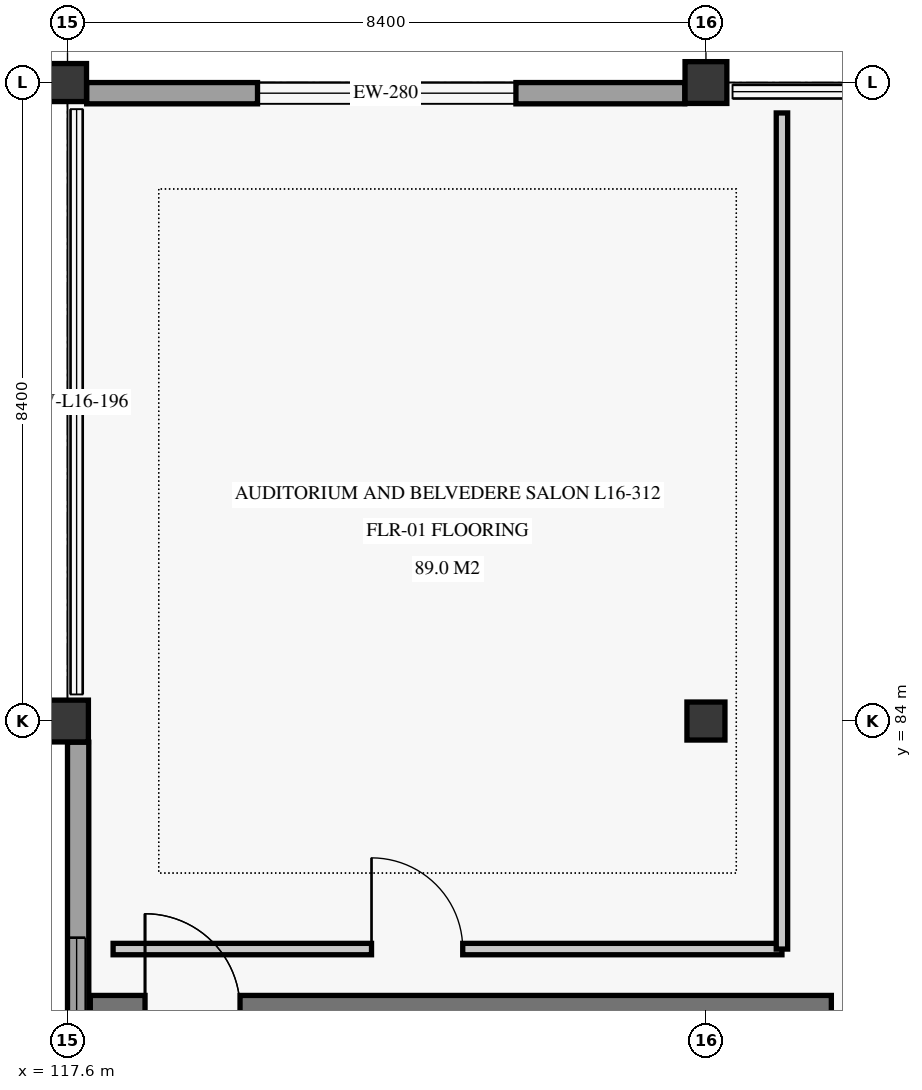
"""IFC4 building model, lengths in metres.
Left out: names, types, materials, properties, quantities, classifications, styles, units other than length and angle.
Written with IfcOpenShell. Run it as: python <this file> out.ifc"""

import sys

from ifc_helpers import new_model, si_unit, direction, frame, frame_2d, origin, origin_2d, place, context, subcontext, project, spatial, polyline, rectangle, outline, extrude, element, fill, save


model = new_model("IFC4")
c1 = context("Model", 3, precision=1e-05, world=origin(), true_north=direction((0.0, 1.0)))
c2 = subcontext(c1, "Body", "Model", "MODEL_VIEW")
j1 = project(units=[si_unit("LENGTHUNIT", "METRE"), si_unit("PLANEANGLEUNIT", "RADIAN")], contexts=[c1])
p1 = place(None, origin())
s1 = spatial("IfcSite", under=j1, at=p1, CompositionType="ELEMENT")
p2 = place(p1, origin())
s2 = spatial("IfcBuilding", under=s1, at=p2, CompositionType="ELEMENT")
p3 = place(p2, frame((0.0, 0.0, 66.7)))
s3 = spatial("IfcBuildingStorey", under=s2, at=p3, CompositionType="ELEMENT", Elevation=66.7)
p4 = place(p3, frame((117.6, 84.0, 0.0), z_axis=(0.0, 0.0, 1.0), x_axis=(1.0, 0.0, 0.0)))
e1 = element("IfcColumn", 1, at=p4, inside=s3, PredefinedType="COLUMN", context=c2, shape_type="SweptSolid", body=[
    extrude(rectangle(XDim=0.55, YDim=0.55, at=origin_2d()), origin(), (0.0, 0.0, 1.0), 4.22),
])
for number, where, z_axis, x_axis in (
    (2, (117.6, 92.4, 0.0), (0.0, 0.0, 1.0), (1.0, 0.0, 0.0)),
    (3, (126.0, 84.0, 0.0), (0.0, 0.0, 1.0), (1.0, 0.0, 0.0)),
):
    element("IfcColumn", number, at=place(p3, frame(where, z_axis=z_axis, x_axis=x_axis)), inside=s3, PredefinedType="COLUMN", context=c2, shape_type="SweptSolid", body=[
        extrude(rectangle(XDim=0.5, YDim=0.5, at=origin_2d()), origin(), (0.0, 0.0, 1.0), 4.22),
    ])
p5 = place(p3, frame((126.0, 92.4, 0.0), z_axis=(0.0, 0.0, 1.0), x_axis=(1.0, 0.0, 0.0)))
e4 = element("IfcColumn", 4, at=p5, inside=s3, PredefinedType="COLUMN", context=c2, shape_type="SweptSolid", body=[
    extrude(rectangle(XDim=0.55, YDim=0.55, at=origin_2d()), origin(), (0.0, 0.0, 1.0), 4.22),
])
p6 = place(p3, frame((117.852, 92.26, 0.0), z_axis=(0.0, 0.0, 1.0), x_axis=(1.0, 0.0, 0.0)))
e5 = element("IfcWall", 5, at=p6, inside=s3, PredefinedType="SOLIDWALL", context=c2, shape_type="SweptSolid", body=[
    extrude(rectangle(XDim=7.87, YDim=0.28, at=frame_2d((3.935, 0.0))), origin(), (0.0, 0.0, 1.0), 3.54),
])
p7 = place(p6, frame((2.248, 0.0, 0.85)))
e6 = element("IfcOpeningElement", 6, at=p7, cuts=e5, PredefinedType="OPENING", context=c2, shape_type="SweptSolid", body=[
    extrude(rectangle(XDim=3.4, YDim=1.9, at=frame_2d((1.7, 0.95))), frame((0.0, 0.15, 0.0), z_axis=(0.0, -1.0, 0.0), x_axis=(1.0, 0.0, 0.0)), (0.0, 0.0, 1.0), 0.3),
])
p8 = place(p3, frame((117.74, 75.852, 0.0), z_axis=(0.0, 0.0, 1.0), x_axis=(0.0, 1.0, 0.0)))
e7 = element("IfcWall", 7, at=p8, inside=s3, PredefinedType="SOLIDWALL", context=c2, shape_type="SweptSolid", body=[
    extrude(rectangle(XDim=7.87, YDim=0.28, at=frame_2d((3.935, 0.0))), origin(), (0.0, 0.0, 1.0), 3.54),
])
p9 = place(p8, frame((0.948, 0.0, 0.85)))
e8 = element("IfcOpeningElement", 8, at=p9, cuts=e7, PredefinedType="OPENING", context=c2, shape_type="SweptSolid", body=[
    extrude(rectangle(XDim=2.2, YDim=1.8, at=frame_2d((1.1, 0.9))), frame((0.0, 0.15, 0.0), z_axis=(0.0, -1.0, 0.0), x_axis=(1.0, 0.0, 0.0)), (0.0, 0.0, 1.0), 0.3),
])
p10 = place(p3, frame((117.766, 92.28, 4.5), z_axis=(0.0, 0.0, 1.0), x_axis=(1.0, 0.0, 0.0)))
e9 = element("IfcWall", 9, at=p10, inside=s3, PredefinedType="SOLIDWALL", context=c2, shape_type="SweptSolid", body=[
    extrude(outline(polyline([(0.0, 0.0), (8.104, 0.0), (8.104, 4.2), (4.052, 3.6), (0.0, 3.0), (0.0, 0.0)])), frame((0.0, 0.115, 0.0), z_axis=(0.0, -1.0, 0.0), x_axis=(1.0, 0.0, 0.0)), (0.0, 0.0, 1.0), 0.23),
])
p11 = place(p3, frame((126.13, 92.28, 4.5), z_axis=(0.0, 0.0, 1.0), x_axis=(1.0, 0.0, 0.0)))
e10 = element("IfcWall", 10, at=p11, inside=s3, PredefinedType="SOLIDWALL", context=c2, shape_type="SweptSolid", body=[
    extrude(rectangle(XDim=8.14, YDim=0.23, at=frame_2d((4.07, 0.0))), origin(), (0.0, 0.0, 1.0), 3.15),
])
p12 = place(p11, frame((2.27, 0.0, 0.45)))
e11 = element("IfcOpeningElement", 11, at=p12, cuts=e10, PredefinedType="OPENING", context=c2, shape_type="SweptSolid", body=[
    extrude(rectangle(XDim=3.6, YDim=2.3, at=frame_2d((1.8, 1.15))), frame((0.0, 0.125, 0.0), z_axis=(0.0, -1.0, 0.0), x_axis=(1.0, 0.0, 0.0)), (0.0, 0.0, 1.0), 0.25),
])
p13 = place(p3, frame((117.72, 75.73, 4.5), z_axis=(0.0, 0.0, 1.0), x_axis=(0.0, 1.0, 0.0)))
e12 = element("IfcWall", 12, at=p13, inside=s3, PredefinedType="SOLIDWALL", context=c2, shape_type="SweptSolid", body=[
    extrude(rectangle(XDim=8.14, YDim=0.23, at=frame_2d((4.07, 0.0))), origin(), (0.0, 0.0, 1.0), 3.15),
])
p14 = place(p13, frame((2.72, 0.0, 0.5)))
e13 = element("IfcOpeningElement", 13, at=p14, cuts=e12, PredefinedType="OPENING", context=c2, shape_type="SweptSolid", body=[
    extrude(rectangle(XDim=2.7, YDim=2.2, at=frame_2d((1.35, 1.1))), frame((0.0, 0.125, 0.0), z_axis=(0.0, -1.0, 0.0), x_axis=(1.0, 0.0, 0.0)), (0.0, 0.0, 1.0), 0.25),
])
p15 = place(p3, frame((117.72, 84.13, 4.5), z_axis=(0.0, 0.0, 1.0), x_axis=(0.0, 1.0, 0.0)))
e14 = element("IfcWall", 14, at=p15, inside=s3, PredefinedType="SOLIDWALL", context=c2, shape_type="SweptSolid", body=[
    extrude(rectangle(XDim=8.104, YDim=0.23, at=frame_2d((4.052, 0.0))), origin(), (0.0, 0.0, 1.0), 3.15),
])
p16 = place(p3, frame((117.9, 80.215, 0.0), z_axis=(0.0, 0.0, 1.0), x_axis=(1.0, 0.0, 0.0)))
e15 = element("IfcWall", 15, at=p16, inside=s3, PredefinedType="SHEAR", context=c2, shape_type="SweptSolid", body=[
    extrude(rectangle(XDim=9.75, YDim=0.35, at=frame_2d((4.875, 0.0))), origin(), (0.0, 0.0, 1.0), 4.22),
])
p17 = place(p16, frame((0.72, 0.0, 0.0)))
e16 = element("IfcOpeningElement", 16, at=p17, cuts=e15, PredefinedType="OPENING", context=c2, shape_type="SweptSolid", body=[
    extrude(rectangle(XDim=1.25, YDim=2.2, at=frame_2d((0.625, 1.1))), frame((0.0, 0.185, 0.0), z_axis=(0.0, -1.0, 0.0), x_axis=(1.0, 0.0, 0.0)), (0.0, 0.0, 1.0), 0.37),
])
p18 = place(p3, frame((117.9, 80.215, 4.5), z_axis=(0.0, 0.0, 1.0), x_axis=(1.0, 0.0, 0.0)))
e17 = element("IfcWall", 17, at=p18, inside=s3, PredefinedType="SHEAR", context=c2, shape_type="SweptSolid", body=[
    extrude(rectangle(XDim=9.75, YDim=0.35, at=frame_2d((4.875, 0.0))), origin(), (0.0, 0.0, 1.0), 3.58),
])
p19 = place(p18, frame((0.72, 0.0, 0.0)))
e18 = element("IfcOpeningElement", 18, at=p19, cuts=e17, PredefinedType="OPENING", context=c2, shape_type="SweptSolid", body=[
    extrude(rectangle(XDim=1.25, YDim=2.2, at=frame_2d((0.625, 1.1))), frame((0.0, 0.185, 0.0), z_axis=(0.0, -1.0, 0.0), x_axis=(1.0, 0.0, 0.0)), (0.0, 0.0, 1.0), 0.37),
])
p20 = place(p3, frame((118.2, 81.0, 0.0), z_axis=(0.0, 0.0, 1.0), x_axis=(1.0, 0.0, 0.0)))
e19 = element("IfcWall", 19, at=p20, inside=s3, PredefinedType="PARTITIONING", context=c2, shape_type="SweptSolid", body=[
    extrude(rectangle(XDim=8.8, YDim=0.15, at=frame_2d((4.4, 0.0))), origin(), (0.0, 0.0, 1.0), 3.84),
])
p21 = place(p20, frame((3.4, 0.0, 0.0)))
e20 = element("IfcOpeningElement", 20, at=p21, cuts=e19, PredefinedType="OPENING", context=c2, shape_type="SweptSolid", body=[
    extrude(rectangle(XDim=1.2, YDim=2.3, at=frame_2d((0.6, 1.15))), frame((0.0, 0.085, 0.0), z_axis=(0.0, -1.0, 0.0), x_axis=(1.0, 0.0, 0.0)), (0.0, 0.0, 1.0), 0.17),
])
p22 = place(p3, frame((127.0, 81.0, 0.0), z_axis=(0.0, 0.0, 1.0), x_axis=(0.0, 1.0, 0.0)))
e21 = element("IfcWall", 21, at=p22, inside=s3, PredefinedType="PARTITIONING", context=c2, shape_type="SweptSolid", body=[
    extrude(rectangle(XDim=11.0, YDim=0.15, at=frame_2d((5.5, 0.0))), origin(), (0.0, 0.0, 1.0), 3.84),
])
p23 = place(p7, origin())
e22 = element("IfcWindow", 22, at=p23, inside=s3, PartitioningType="SINGLE_PANEL", PredefinedType="WINDOW", context=c2, shape_type="SweptSolid", body=[
    extrude(rectangle(XDim=3.4, YDim=1.9, at=frame_2d((1.7, 0.95))), frame((0.0, 0.03, 0.0), z_axis=(0.0, -1.0, 0.0), x_axis=(1.0, 0.0, 0.0)), (0.0, 0.0, 1.0), 0.06),
])
fill(e6, e22)
p24 = place(p14, origin())
e23 = element("IfcWindow", 23, at=p24, inside=s3, PartitioningType="SINGLE_PANEL", PredefinedType="WINDOW", context=c2, shape_type="SweptSolid", body=[
    extrude(rectangle(XDim=2.7, YDim=2.2, at=frame_2d((1.35, 1.1))), frame((0.0, 0.03, 0.0), z_axis=(0.0, -1.0, 0.0), x_axis=(1.0, 0.0, 0.0)), (0.0, 0.0, 1.0), 0.06),
])
fill(e13, e23)
p25 = place(p17, origin())
e24 = element("IfcDoor", 24, at=p25, inside=s3, OperationType="SINGLE_SWING_LEFT", PredefinedType="DOOR", context=c2, shape_type="SweptSolid", body=[
    extrude(rectangle(XDim=1.25, YDim=2.2, at=frame_2d((0.625, 1.1))), frame((0.0, 0.025, 0.0), z_axis=(0.0, -1.0, 0.0), x_axis=(1.0, 0.0, 0.0)), (0.0, 0.0, 1.0), 0.05),
])
fill(e16, e24)
p26 = place(p19, origin())
e25 = element("IfcDoor", 25, at=p26, inside=s3, OperationType="SINGLE_SWING_LEFT", PredefinedType="DOOR", context=c2, shape_type="SweptSolid", body=[
    extrude(rectangle(XDim=1.25, YDim=2.2, at=frame_2d((0.625, 1.1))), frame((0.0, 0.025, 0.0), z_axis=(0.0, -1.0, 0.0), x_axis=(1.0, 0.0, 0.0)), (0.0, 0.0, 1.0), 0.05),
])
fill(e18, e25)
p27 = place(p21, origin())
e26 = element("IfcDoor", 26, at=p27, inside=s3, OperationType="SINGLE_SWING_LEFT", PredefinedType="DOOR", context=c2, shape_type="SweptSolid", body=[
    extrude(rectangle(XDim=1.2, YDim=2.3, at=frame_2d((0.6, 1.15))), frame((0.0, 0.025, 0.0), z_axis=(0.0, -1.0, 0.0), x_axis=(1.0, 0.0, 0.0)), (0.0, 0.0, 1.0), 0.05),
])
fill(e20, e26)
save(model, sys.argv[1])
